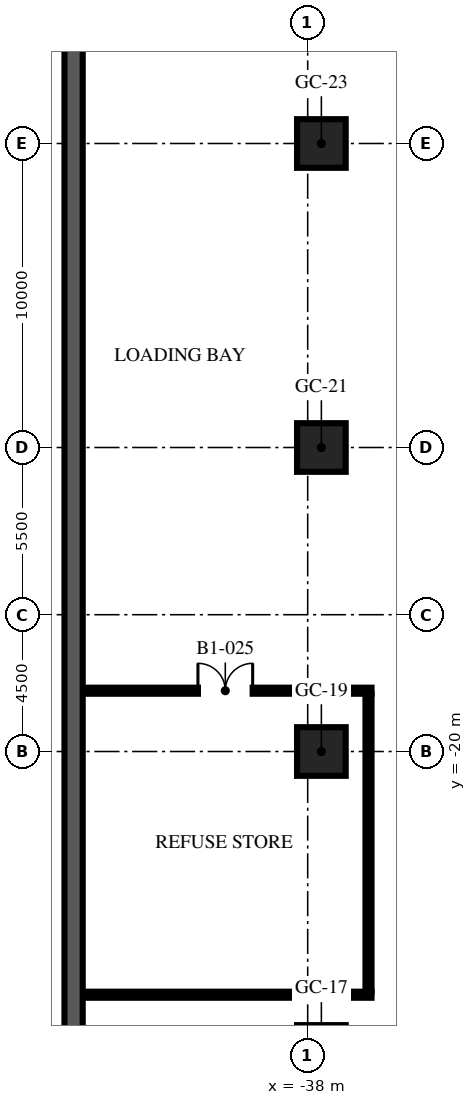
"""IFC4 building model, lengths in metres.
Left out: names, types, materials, properties, quantities, classifications, styles, units other than length and angle.
Written with IfcOpenShell. Run it as: python <this file> out.ifc"""

import sys

from ifc_helpers import new_model, si_unit, direction, frame, frame_2d, origin, origin_2d, place, context, subcontext, project, spatial, rectangle, extrude, element, fill, save


model = new_model("IFC4")
c1 = context("Model", 3, precision=1e-05, world=origin(), true_north=direction((0.0, 1.0)))
c2 = subcontext(c1, "Body", "Model", "MODEL_VIEW")
j1 = project(units=[si_unit("LENGTHUNIT", "METRE"), si_unit("PLANEANGLEUNIT", "RADIAN")], contexts=[c1])
p1 = place(None, origin())
s1 = spatial("IfcSite", under=j1, at=p1, CompositionType="ELEMENT")
p2 = place(p1, origin())
s2 = spatial("IfcBuilding", under=s1, at=p2, CompositionType="ELEMENT")
p3 = place(p2, frame((0.0, 0.0, -5.4)))
s3 = spatial("IfcBuildingStorey", under=s2, at=p3, CompositionType="ELEMENT", Elevation=-5.4)
p4 = place(p3, frame((-45.7, -49.4, -0.3), z_axis=(0.0, 0.0, 1.0), x_axis=(0.0, 1.0, 0.0)))
e1 = element("IfcWall", 1, at=p4, inside=s3, PredefinedType="SOLIDWALL", context=c2, shape_type="SweptSolid", body=[
    extrude(rectangle(XDim=98.8, YDim=0.6, at=frame_2d((49.4, 0.0))), origin(), (0.0, 0.0, 1.0), 5.1),
])
for number, where, z_axis, x_axis in (
    (2, (-37.55, -20.0, 0.0), (0.0, 0.0, 1.0), (1.0, 0.0, 0.0)),
    (3, (-37.55, -10.0, 0.0), (0.0, 0.0, 1.0), (1.0, 0.0, 0.0)),
    (4, (-37.55, 0.0, 0.0), (0.0, 0.0, 1.0), (1.0, 0.0, 0.0)),
):
    element("IfcColumn", number, at=place(p3, frame(where, z_axis=z_axis, x_axis=x_axis)), inside=s3, PredefinedType="COLUMN", context=c2, shape_type="SweptSolid", body=[
        extrude(rectangle(XDim=1.6, YDim=1.6, at=origin_2d()), origin(), (0.0, 0.0, 1.0), 5.4),
    ])
p5 = place(p3, frame((-45.38, -28.0, 0.0), z_axis=(0.0, 0.0, 1.0), x_axis=(1.0, 0.0, 0.0)))
e5 = element("IfcWall", 5, at=p5, inside=s3, PredefinedType="SOLIDWALL", context=c2, shape_type="SweptSolid", body=[
    extrude(rectangle(XDim=9.48, YDim=0.2, at=frame_2d((4.74, 0.0))), origin(), (0.0, 0.0, 1.0), 4.1),
])
p6 = place(p3, frame((-36.0, -27.9, 0.0), z_axis=(0.0, 0.0, 1.0), x_axis=(0.0, 1.0, 0.0)))
e6 = element("IfcWall", 6, at=p6, inside=s3, PredefinedType="SOLIDWALL", context=c2, shape_type="SweptSolid", body=[
    extrude(rectangle(XDim=9.8, YDim=0.2, at=frame_2d((4.9, 0.0))), origin(), (0.0, 0.0, 1.0), 4.1),
])
p7 = place(p3, frame((-45.38, -18.0, 0.0), z_axis=(0.0, 0.0, 1.0), x_axis=(1.0, 0.0, 0.0)))
e7 = element("IfcWall", 7, at=p7, inside=s3, PredefinedType="SOLIDWALL", context=c2, shape_type="SweptSolid", body=[
    extrude(rectangle(XDim=9.48, YDim=0.2, at=frame_2d((4.74, 0.0))), origin(), (0.0, 0.0, 1.0), 4.1),
])
p8 = place(p7, frame((3.77, 0.0, 0.0)))
e8 = element("IfcOpeningElement", 8, at=p8, cuts=e7, PredefinedType="OPENING", context=c2, shape_type="SweptSolid", body=[
    extrude(rectangle(XDim=1.8, YDim=2.4, at=frame_2d((0.9, 1.2))), frame((0.0, 0.11, 0.0), z_axis=(0.0, -1.0, 0.0), x_axis=(1.0, 0.0, 0.0)), (0.0, 0.0, 1.0), 0.22),
])
p9 = place(p8, origin())
e9 = element("IfcDoor", 9, at=p9, inside=s3, OperationType="DOUBLE_DOOR_SINGLE_SWING", PredefinedType="DOOR", context=c2, shape_type="SweptSolid", body=[
    extrude(rectangle(XDim=1.8, YDim=2.4, at=frame_2d((0.9, 1.2))), frame((0.0, 0.025, 0.0), z_axis=(0.0, -1.0, 0.0), x_axis=(1.0, 0.0, 0.0)), (0.0, 0.0, 1.0), 0.05),
])
fill(e8, e9)
save(model, sys.argv[1])
